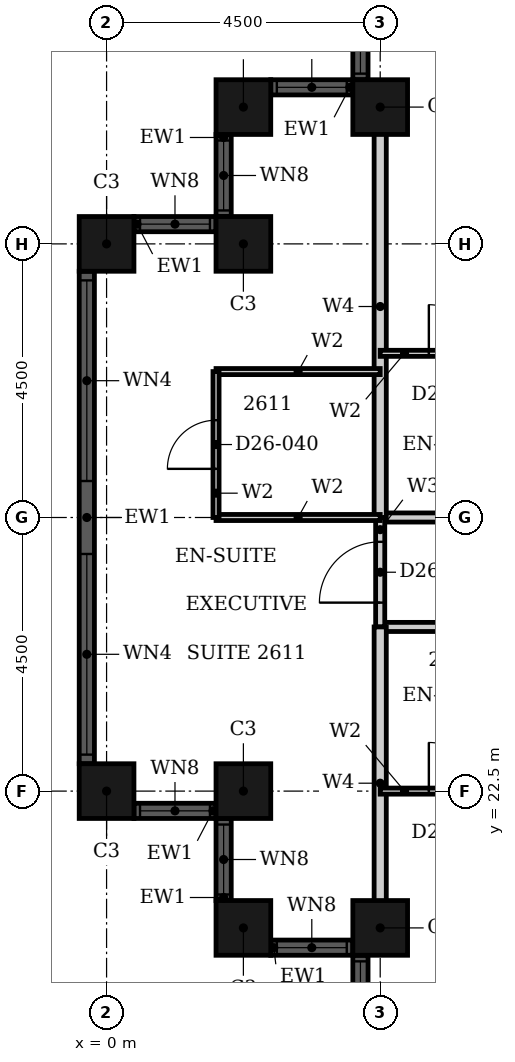
"""IFC4 building model, lengths in metres.
Left out: names, types, materials, properties, quantities, classifications, styles, units other than length and angle.
Written with IfcOpenShell. Run it as: python <this file> out.ifc"""

import sys

from ifc_helpers import new_model, si_unit, direction, frame, frame_2d, origin, origin_2d, place, context, subcontext, project, spatial, rectangle, hollow_rectangle, extrude, element, fill, save


model = new_model("IFC4")
c1 = context("Model", 3, precision=1e-05, world=origin(), true_north=direction((0.0, 1.0)))
c2 = subcontext(c1, "Body", "Model", "MODEL_VIEW")
j1 = project(units=[si_unit("LENGTHUNIT", "METRE"), si_unit("PLANEANGLEUNIT", "RADIAN")], contexts=[c1])
p1 = place(None, origin())
s1 = spatial("IfcSite", under=j1, at=p1, CompositionType="ELEMENT")
p2 = place(p1, origin())
s2 = spatial("IfcBuilding", under=s1, at=p2, CompositionType="ELEMENT")
p3 = place(p2, frame((0.0, 0.0, 108.0)))
s3 = spatial("IfcBuildingStorey", under=s2, at=p3, CompositionType="ELEMENT", Elevation=108.0)
for number, where, z_axis, x_axis in (
    (1, (4.5, 33.75, 0.0), (0.0, 0.0, 1.0), (1.0, 0.0, 0.0)),
    (2, (2.25, 33.75, 0.0), (0.0, 0.0, 1.0), (1.0, 0.0, 0.0)),
    (3, (2.25, 31.5, 0.0), (0.0, 0.0, 1.0), (1.0, 0.0, 0.0)),
    (4, (0.0, 31.5, 0.0), (0.0, 0.0, 1.0), (1.0, 0.0, 0.0)),
    (5, (0.0, 22.5, 0.0), (0.0, 0.0, 1.0), (1.0, 0.0, 0.0)),
    (6, (2.25, 22.5, 0.0), (0.0, 0.0, 1.0), (1.0, 0.0, 0.0)),
    (7, (2.25, 20.25, 0.0), (0.0, 0.0, 1.0), (1.0, 0.0, 0.0)),
    (8, (4.5, 20.25, 0.0), (0.0, 0.0, 1.0), (1.0, 0.0, 0.0)),
):
    element("IfcColumn", number, at=place(p3, frame(where, z_axis=z_axis, x_axis=x_axis)), inside=s3, PredefinedType="COLUMN", context=c2, shape_type="SweptSolid", body=[
        extrude(hollow_rectangle(XDim=0.9, YDim=0.9, WallThickness=0.028, at=origin_2d()), origin(), (0.0, 0.0, 1.0), 3.6),
    ])
p4 = place(p3, frame((4.175, 35.55, 0.0), z_axis=(0.0, 0.0, 1.0), x_axis=(0.0, -1.0, 0.0)))
e9 = element("IfcWall", 9, at=p4, inside=s3, PredefinedType="SOLIDWALL", context=c2, shape_type="SweptSolid", body=[
    extrude(rectangle(XDim=1.35, YDim=0.25, at=frame_2d((0.675, 0.0))), origin(), (0.0, 0.0, 1.0), 3.6),
])
p5 = place(p4, frame((0.1, 0.0, 0.9)))
e10 = element("IfcOpeningElement", 10, at=p5, cuts=e9, PredefinedType="OPENING", context=c2, shape_type="SweptSolid", body=[
    extrude(rectangle(XDim=1.15, YDim=2.08, at=frame_2d((0.575, 1.04))), frame((0.0, 0.135, 0.0), z_axis=(0.0, -1.0, 0.0), x_axis=(1.0, 0.0, 0.0)), (0.0, 0.0, 1.0), 0.27),
])
p6 = place(p3, frame((4.05, 34.075, 0.0), z_axis=(0.0, 0.0, 1.0), x_axis=(-1.0, 0.0, 0.0)))
e11 = element("IfcWall", 11, at=p6, inside=s3, PredefinedType="SOLIDWALL", context=c2, shape_type="SweptSolid", body=[
    extrude(rectangle(XDim=1.35, YDim=0.25, at=frame_2d((0.675, 0.0))), origin(), (0.0, 0.0, 1.0), 3.6),
])
p7 = place(p6, frame((0.1, 0.0, 0.9)))
e12 = element("IfcOpeningElement", 12, at=p7, cuts=e11, PredefinedType="OPENING", context=c2, shape_type="SweptSolid", body=[
    extrude(rectangle(XDim=1.15, YDim=2.08, at=frame_2d((0.575, 1.04))), frame((0.0, 0.135, 0.0), z_axis=(0.0, -1.0, 0.0), x_axis=(1.0, 0.0, 0.0)), (0.0, 0.0, 1.0), 0.27),
])
p8 = place(p3, frame((1.925, 33.3, 0.0), z_axis=(0.0, 0.0, 1.0), x_axis=(0.0, -1.0, 0.0)))
e13 = element("IfcWall", 13, at=p8, inside=s3, PredefinedType="SOLIDWALL", context=c2, shape_type="SweptSolid", body=[
    extrude(rectangle(XDim=1.35, YDim=0.25, at=frame_2d((0.675, 0.0))), origin(), (0.0, 0.0, 1.0), 3.6),
])
p9 = place(p8, frame((0.1, 0.0, 0.9)))
e14 = element("IfcOpeningElement", 14, at=p9, cuts=e13, PredefinedType="OPENING", context=c2, shape_type="SweptSolid", body=[
    extrude(rectangle(XDim=1.15, YDim=2.08, at=frame_2d((0.575, 1.04))), frame((0.0, 0.135, 0.0), z_axis=(0.0, -1.0, 0.0), x_axis=(1.0, 0.0, 0.0)), (0.0, 0.0, 1.0), 0.27),
])
p10 = place(p3, frame((1.8, 31.825, 0.0), z_axis=(0.0, 0.0, 1.0), x_axis=(-1.0, 0.0, 0.0)))
e15 = element("IfcWall", 15, at=p10, inside=s3, PredefinedType="SOLIDWALL", context=c2, shape_type="SweptSolid", body=[
    extrude(rectangle(XDim=1.35, YDim=0.25, at=frame_2d((0.675, 0.0))), origin(), (0.0, 0.0, 1.0), 3.6),
])
p11 = place(p10, frame((0.1, 0.0, 0.9)))
e16 = element("IfcOpeningElement", 16, at=p11, cuts=e15, PredefinedType="OPENING", context=c2, shape_type="SweptSolid", body=[
    extrude(rectangle(XDim=1.15, YDim=2.08, at=frame_2d((0.575, 1.04))), frame((0.0, 0.135, 0.0), z_axis=(0.0, -1.0, 0.0), x_axis=(1.0, 0.0, 0.0)), (0.0, 0.0, 1.0), 0.27),
])
p12 = place(p3, frame((-0.325, 31.05, 0.0), z_axis=(0.0, 0.0, 1.0), x_axis=(0.0, -1.0, 0.0)))
e17 = element("IfcWall", 17, at=p12, inside=s3, PredefinedType="SOLIDWALL", context=c2, shape_type="SweptSolid", body=[
    extrude(rectangle(XDim=8.1, YDim=0.25, at=frame_2d((4.05, 0.0))), origin(), (0.0, 0.0, 1.0), 3.6),
])
p13 = place(p12, frame((0.15, 0.0, 0.9)))
e18 = element("IfcOpeningElement", 18, at=p13, cuts=e17, PredefinedType="OPENING", context=c2, shape_type="SweptSolid", body=[
    extrude(rectangle(XDim=3.3, YDim=2.08, at=frame_2d((1.65, 1.04))), frame((0.0, 0.135, 0.0), z_axis=(0.0, -1.0, 0.0), x_axis=(1.0, 0.0, 0.0)), (0.0, 0.0, 1.0), 0.27),
])
p14 = place(p12, frame((4.65, 0.0, 0.9)))
e19 = element("IfcOpeningElement", 19, at=p14, cuts=e17, PredefinedType="OPENING", context=c2, shape_type="SweptSolid", body=[
    extrude(rectangle(XDim=3.3, YDim=2.08, at=frame_2d((1.65, 1.04))), frame((0.0, 0.135, 0.0), z_axis=(0.0, -1.0, 0.0), x_axis=(1.0, 0.0, 0.0)), (0.0, 0.0, 1.0), 0.27),
])
p15 = place(p3, frame((0.45, 22.175, 0.0), z_axis=(0.0, 0.0, 1.0), x_axis=(1.0, 0.0, 0.0)))
e20 = element("IfcWall", 20, at=p15, inside=s3, PredefinedType="SOLIDWALL", context=c2, shape_type="SweptSolid", body=[
    extrude(rectangle(XDim=1.35, YDim=0.25, at=frame_2d((0.675, 0.0))), origin(), (0.0, 0.0, 1.0), 3.6),
])
p16 = place(p15, frame((0.1, 0.0, 0.9)))
e21 = element("IfcOpeningElement", 21, at=p16, cuts=e20, PredefinedType="OPENING", context=c2, shape_type="SweptSolid", body=[
    extrude(rectangle(XDim=1.15, YDim=2.08, at=frame_2d((0.575, 1.04))), frame((0.0, 0.135, 0.0), z_axis=(0.0, -1.0, 0.0), x_axis=(1.0, 0.0, 0.0)), (0.0, 0.0, 1.0), 0.27),
])
p17 = place(p3, frame((1.925, 22.05, 0.0), z_axis=(0.0, 0.0, 1.0), x_axis=(0.0, -1.0, 0.0)))
e22 = element("IfcWall", 22, at=p17, inside=s3, PredefinedType="SOLIDWALL", context=c2, shape_type="SweptSolid", body=[
    extrude(rectangle(XDim=1.35, YDim=0.25, at=frame_2d((0.675, 0.0))), origin(), (0.0, 0.0, 1.0), 3.6),
])
p18 = place(p17, frame((0.1, 0.0, 0.9)))
e23 = element("IfcOpeningElement", 23, at=p18, cuts=e22, PredefinedType="OPENING", context=c2, shape_type="SweptSolid", body=[
    extrude(rectangle(XDim=1.15, YDim=2.08, at=frame_2d((0.575, 1.04))), frame((0.0, 0.135, 0.0), z_axis=(0.0, -1.0, 0.0), x_axis=(1.0, 0.0, 0.0)), (0.0, 0.0, 1.0), 0.27),
])
p19 = place(p3, frame((2.7, 19.925, 0.0), z_axis=(0.0, 0.0, 1.0), x_axis=(1.0, 0.0, 0.0)))
e24 = element("IfcWall", 24, at=p19, inside=s3, PredefinedType="SOLIDWALL", context=c2, shape_type="SweptSolid", body=[
    extrude(rectangle(XDim=1.35, YDim=0.25, at=frame_2d((0.675, 0.0))), origin(), (0.0, 0.0, 1.0), 3.6),
])
p20 = place(p19, frame((0.1, 0.0, 0.9)))
e25 = element("IfcOpeningElement", 25, at=p20, cuts=e24, PredefinedType="OPENING", context=c2, shape_type="SweptSolid", body=[
    extrude(rectangle(XDim=1.15, YDim=2.08, at=frame_2d((0.575, 1.04))), frame((0.0, 0.135, 0.0), z_axis=(0.0, -1.0, 0.0), x_axis=(1.0, 0.0, 0.0)), (0.0, 0.0, 1.0), 0.27),
])
p21 = place(p3, frame((4.175, 19.8, 0.0), z_axis=(0.0, 0.0, 1.0), x_axis=(0.0, -1.0, 0.0)))
e26 = element("IfcWall", 26, at=p21, inside=s3, PredefinedType="SOLIDWALL", context=c2, shape_type="SweptSolid", body=[
    extrude(rectangle(XDim=1.35, YDim=0.25, at=frame_2d((0.675, 0.0))), origin(), (0.0, 0.0, 1.0), 3.6),
])
p22 = place(p21, frame((0.1, 0.0, 0.9)))
e27 = element("IfcOpeningElement", 27, at=p22, cuts=e26, PredefinedType="OPENING", context=c2, shape_type="SweptSolid", body=[
    extrude(rectangle(XDim=1.15, YDim=2.08, at=frame_2d((0.575, 1.04))), frame((0.0, 0.135, 0.0), z_axis=(0.0, -1.0, 0.0), x_axis=(1.0, 0.0, 0.0)), (0.0, 0.0, 1.0), 0.27),
])
p23 = place(p3, frame((4.5, 25.2, 0.0), z_axis=(0.0, 0.0, 1.0), x_axis=(1.0, 0.0, 0.0)))
e28 = element("IfcWall", 28, at=p23, inside=s3, PredefinedType="PARTITIONING", context=c2, shape_type="SweptSolid", body=[
    extrude(rectangle(XDim=11.7, YDim=0.15, at=frame_2d((5.85, 0.0))), origin(), (0.0, 0.0, 1.0), 3.3),
])
p24 = place(p23, frame((7.45, 0.0, 0.0)))
e29 = element("IfcOpeningElement", 29, at=p24, cuts=e28, PredefinedType="OPENING", context=c2, shape_type="SweptSolid", body=[
    extrude(rectangle(XDim=1.0, YDim=2.1, at=frame_2d((0.5, 1.05))), frame((0.0, 0.085, 0.0), z_axis=(0.0, -1.0, 0.0), x_axis=(1.0, 0.0, 0.0)), (0.0, 0.0, 1.0), 0.17),
])
p25 = place(p23, frame((2.95, 0.0, 0.0)))
e30 = element("IfcOpeningElement", 30, at=p25, cuts=e28, PredefinedType="OPENING", context=c2, shape_type="SweptSolid", body=[
    extrude(rectangle(XDim=1.0, YDim=2.1, at=frame_2d((0.5, 1.05))), frame((0.0, 0.085, 0.0), z_axis=(0.0, -1.0, 0.0), x_axis=(1.0, 0.0, 0.0)), (0.0, 0.0, 1.0), 0.17),
])
p26 = place(p3, frame((4.5, 27.0, 0.0), z_axis=(0.0, 0.0, 1.0), x_axis=(1.0, 0.0, 0.0)))
e31 = element("IfcWall", 31, at=p26, inside=s3, PredefinedType="PARTITIONING", context=c2, shape_type="SweptSolid", body=[
    extrude(rectangle(XDim=11.7, YDim=0.15, at=frame_2d((5.85, 0.0))), origin(), (0.0, 0.0, 1.0), 2.58),
])
p27 = place(p26, frame((6.25, 0.0, 0.0)))
e32 = element("IfcOpeningElement", 32, at=p27, cuts=e31, PredefinedType="OPENING", context=c2, shape_type="SweptSolid", body=[
    extrude(rectangle(XDim=1.0, YDim=2.1, at=frame_2d((0.5, 1.05))), frame((0.0, 0.085, 0.0), z_axis=(0.0, -1.0, 0.0), x_axis=(1.0, 0.0, 0.0)), (0.0, 0.0, 1.0), 0.17),
])
p28 = place(p3, frame((4.5, 25.2, 0.0), z_axis=(0.0, 0.0, 1.0), x_axis=(0.0, 1.0, 0.0)))
e33 = element("IfcWall", 33, at=p28, inside=s3, PredefinedType="PARTITIONING", context=c2, shape_type="SweptSolid", body=[
    extrude(rectangle(XDim=1.8, YDim=0.15, at=frame_2d((0.9, 0.0))), origin(), (0.0, 0.0, 1.0), 3.3),
])
p29 = place(p28, frame((0.4, 0.0, 0.0)))
e34 = element("IfcOpeningElement", 34, at=p29, cuts=e33, PredefinedType="OPENING", context=c2, shape_type="SweptSolid", body=[
    extrude(rectangle(XDim=1.0, YDim=2.1, at=frame_2d((0.5, 1.05))), frame((0.0, 0.085, 0.0), z_axis=(0.0, -1.0, 0.0), x_axis=(1.0, 0.0, 0.0)), (0.0, 0.0, 1.0), 0.17),
])
p30 = place(p3, frame((4.5, 20.06, 0.0), z_axis=(0.0, 0.0, 1.0), x_axis=(0.0, 1.0, 0.0)))
e35 = element("IfcWall", 35, at=p30, inside=s3, PredefinedType="PARTITIONING", context=c2, shape_type="SweptSolid", body=[
    extrude(rectangle(XDim=5.14, YDim=0.2, at=frame_2d((2.57, 0.0))), origin(), (0.0, 0.0, 1.0), 3.3),
])
p31 = place(p3, frame((4.5, 27.0, 0.0), z_axis=(0.0, 0.0, 1.0), x_axis=(0.0, 1.0, 0.0)))
e36 = element("IfcWall", 36, at=p31, inside=s3, PredefinedType="PARTITIONING", context=c2, shape_type="SweptSolid", body=[
    extrude(rectangle(XDim=6.94, YDim=0.2, at=frame_2d((3.47, 0.0))), origin(), (0.0, 0.0, 1.0), 3.3),
])
p32 = place(p3, frame((4.5, 22.5, 0.0), z_axis=(0.0, 0.0, 1.0), x_axis=(1.0, 0.0, 0.0)))
e37 = element("IfcWall", 37, at=p32, inside=s3, PredefinedType="PARTITIONING", context=c2, shape_type="SweptSolid", body=[
    extrude(rectangle(XDim=2.4, YDim=0.1, at=frame_2d((1.2, 0.0))), origin(), (0.0, 0.0, 1.0), 2.58),
])
p33 = place(p32, frame((0.8, 0.0, 0.0)))
e38 = element("IfcOpeningElement", 38, at=p33, cuts=e37, PredefinedType="OPENING", context=c2, shape_type="SweptSolid", body=[
    extrude(rectangle(XDim=0.8, YDim=2.1, at=frame_2d((0.4, 1.05))), frame((0.0, 0.06, 0.0), z_axis=(0.0, -1.0, 0.0), x_axis=(1.0, 0.0, 0.0)), (0.0, 0.0, 1.0), 0.12),
])
p34 = place(p3, frame((1.8, 27.0, 0.0), z_axis=(0.0, 0.0, 1.0), x_axis=(1.0, 0.0, 0.0)))
e39 = element("IfcWall", 39, at=p34, inside=s3, PredefinedType="PARTITIONING", context=c2, shape_type="SweptSolid", body=[
    extrude(rectangle(XDim=2.7, YDim=0.1, at=frame_2d((1.35, 0.0))), origin(), (0.0, 0.0, 1.0), 2.58),
])
p35 = place(p3, frame((1.8, 29.4, 0.0), z_axis=(0.0, 0.0, 1.0), x_axis=(1.0, 0.0, 0.0)))
e40 = element("IfcWall", 40, at=p35, inside=s3, PredefinedType="PARTITIONING", context=c2, shape_type="SweptSolid", body=[
    extrude(rectangle(XDim=2.7, YDim=0.1, at=frame_2d((1.35, 0.0))), origin(), (0.0, 0.0, 1.0), 3.3),
])
p36 = place(p3, frame((4.5, 29.7, 0.0), z_axis=(0.0, 0.0, 1.0), x_axis=(1.0, 0.0, 0.0)))
e41 = element("IfcWall", 41, at=p36, inside=s3, PredefinedType="PARTITIONING", context=c2, shape_type="SweptSolid", body=[
    extrude(rectangle(XDim=2.4, YDim=0.1, at=frame_2d((1.2, 0.0))), origin(), (0.0, 0.0, 1.0), 3.3),
])
p37 = place(p36, frame((0.8, 0.0, 0.0)))
e42 = element("IfcOpeningElement", 42, at=p37, cuts=e41, PredefinedType="OPENING", context=c2, shape_type="SweptSolid", body=[
    extrude(rectangle(XDim=0.8, YDim=2.1, at=frame_2d((0.4, 1.05))), frame((0.0, 0.06, 0.0), z_axis=(0.0, -1.0, 0.0), x_axis=(1.0, 0.0, 0.0)), (0.0, 0.0, 1.0), 0.12),
])
p38 = place(p3, frame((1.8, 27.0, 0.0), z_axis=(0.0, 0.0, 1.0), x_axis=(0.0, 1.0, 0.0)))
e43 = element("IfcWall", 43, at=p38, inside=s3, PredefinedType="PARTITIONING", context=c2, shape_type="SweptSolid", body=[
    extrude(rectangle(XDim=2.4, YDim=0.1, at=frame_2d((1.2, 0.0))), origin(), (0.0, 0.0, 1.0), 3.3),
])
p39 = place(p38, frame((0.8, 0.0, 0.0)))
e44 = element("IfcOpeningElement", 44, at=p39, cuts=e43, PredefinedType="OPENING", context=c2, shape_type="SweptSolid", body=[
    extrude(rectangle(XDim=0.8, YDim=2.1, at=frame_2d((0.4, 1.05))), frame((0.0, 0.06, 0.0), z_axis=(0.0, -1.0, 0.0), x_axis=(1.0, 0.0, 0.0)), (0.0, 0.0, 1.0), 0.12),
])
p40 = place(p5, origin())
e45 = element("IfcWindow", 45, at=p40, inside=s3, PartitioningType="SINGLE_PANEL", PredefinedType="WINDOW", context=c2, shape_type="SweptSolid", body=[
    extrude(rectangle(XDim=1.15, YDim=2.08, at=frame_2d((0.575, 1.04))), frame((0.0, 0.03, 0.0), z_axis=(0.0, -1.0, 0.0), x_axis=(1.0, 0.0, 0.0)), (0.0, 0.0, 1.0), 0.06),
])
fill(e10, e45)
p41 = place(p7, origin())
e46 = element("IfcWindow", 46, at=p41, inside=s3, PartitioningType="SINGLE_PANEL", PredefinedType="WINDOW", context=c2, shape_type="SweptSolid", body=[
    extrude(rectangle(XDim=1.15, YDim=2.08, at=frame_2d((0.575, 1.04))), frame((0.0, 0.03, 0.0), z_axis=(0.0, -1.0, 0.0), x_axis=(1.0, 0.0, 0.0)), (0.0, 0.0, 1.0), 0.06),
])
fill(e12, e46)
p42 = place(p9, origin())
e47 = element("IfcWindow", 47, at=p42, inside=s3, PartitioningType="SINGLE_PANEL", PredefinedType="WINDOW", context=c2, shape_type="SweptSolid", body=[
    extrude(rectangle(XDim=1.15, YDim=2.08, at=frame_2d((0.575, 1.04))), frame((0.0, 0.03, 0.0), z_axis=(0.0, -1.0, 0.0), x_axis=(1.0, 0.0, 0.0)), (0.0, 0.0, 1.0), 0.06),
])
fill(e14, e47)
p43 = place(p11, origin())
e48 = element("IfcWindow", 48, at=p43, inside=s3, PartitioningType="SINGLE_PANEL", PredefinedType="WINDOW", context=c2, shape_type="SweptSolid", body=[
    extrude(rectangle(XDim=1.15, YDim=2.08, at=frame_2d((0.575, 1.04))), frame((0.0, 0.03, 0.0), z_axis=(0.0, -1.0, 0.0), x_axis=(1.0, 0.0, 0.0)), (0.0, 0.0, 1.0), 0.06),
])
fill(e16, e48)
p44 = place(p13, origin())
e49 = element("IfcWindow", 49, at=p44, inside=s3, PartitioningType="SINGLE_PANEL", PredefinedType="WINDOW", context=c2, shape_type="SweptSolid", body=[
    extrude(rectangle(XDim=3.3, YDim=2.08, at=frame_2d((1.65, 1.04))), frame((0.0, 0.03, 0.0), z_axis=(0.0, -1.0, 0.0), x_axis=(1.0, 0.0, 0.0)), (0.0, 0.0, 1.0), 0.06),
])
fill(e18, e49)
p45 = place(p14, origin())
e50 = element("IfcWindow", 50, at=p45, inside=s3, PartitioningType="SINGLE_PANEL", PredefinedType="WINDOW", context=c2, shape_type="SweptSolid", body=[
    extrude(rectangle(XDim=3.3, YDim=2.08, at=frame_2d((1.65, 1.04))), frame((0.0, 0.03, 0.0), z_axis=(0.0, -1.0, 0.0), x_axis=(1.0, 0.0, 0.0)), (0.0, 0.0, 1.0), 0.06),
])
fill(e19, e50)
p46 = place(p16, origin())
e51 = element("IfcWindow", 51, at=p46, inside=s3, PartitioningType="SINGLE_PANEL", PredefinedType="WINDOW", context=c2, shape_type="SweptSolid", body=[
    extrude(rectangle(XDim=1.15, YDim=2.08, at=frame_2d((0.575, 1.04))), frame((0.0, 0.03, 0.0), z_axis=(0.0, -1.0, 0.0), x_axis=(1.0, 0.0, 0.0)), (0.0, 0.0, 1.0), 0.06),
])
fill(e21, e51)
p47 = place(p18, origin())
e52 = element("IfcWindow", 52, at=p47, inside=s3, PartitioningType="SINGLE_PANEL", PredefinedType="WINDOW", context=c2, shape_type="SweptSolid", body=[
    extrude(rectangle(XDim=1.15, YDim=2.08, at=frame_2d((0.575, 1.04))), frame((0.0, 0.03, 0.0), z_axis=(0.0, -1.0, 0.0), x_axis=(1.0, 0.0, 0.0)), (0.0, 0.0, 1.0), 0.06),
])
fill(e23, e52)
p48 = place(p20, origin())
e53 = element("IfcWindow", 53, at=p48, inside=s3, PartitioningType="SINGLE_PANEL", PredefinedType="WINDOW", context=c2, shape_type="SweptSolid", body=[
    extrude(rectangle(XDim=1.15, YDim=2.08, at=frame_2d((0.575, 1.04))), frame((0.0, 0.03, 0.0), z_axis=(0.0, -1.0, 0.0), x_axis=(1.0, 0.0, 0.0)), (0.0, 0.0, 1.0), 0.06),
])
fill(e25, e53)
p49 = place(p22, origin())
e54 = element("IfcWindow", 54, at=p49, inside=s3, PartitioningType="SINGLE_PANEL", PredefinedType="WINDOW", context=c2, shape_type="SweptSolid", body=[
    extrude(rectangle(XDim=1.15, YDim=2.08, at=frame_2d((0.575, 1.04))), frame((0.0, 0.03, 0.0), z_axis=(0.0, -1.0, 0.0), x_axis=(1.0, 0.0, 0.0)), (0.0, 0.0, 1.0), 0.06),
])
fill(e27, e54)
p50 = place(p33, origin())
e55 = element("IfcDoor", 55, at=p50, inside=s3, OperationType="SINGLE_SWING_LEFT", PredefinedType="DOOR", context=c2, shape_type="SweptSolid", body=[
    extrude(rectangle(XDim=0.8, YDim=2.1, at=frame_2d((0.4, 1.05))), frame((0.0, 0.025, 0.0), z_axis=(0.0, -1.0, 0.0), x_axis=(1.0, 0.0, 0.0)), (0.0, 0.0, 1.0), 0.05),
])
fill(e38, e55)
p51 = place(p37, origin())
e56 = element("IfcDoor", 56, at=p51, inside=s3, OperationType="SINGLE_SWING_RIGHT", PredefinedType="DOOR", context=c2, shape_type="SweptSolid", body=[
    extrude(rectangle(XDim=0.8, YDim=2.1, at=frame_2d((0.4, 1.05))), frame((0.0, 0.025, 0.0), z_axis=(0.0, -1.0, 0.0), x_axis=(1.0, 0.0, 0.0)), (0.0, 0.0, 1.0), 0.05),
])
fill(e42, e56)
p52 = place(p29, origin())
e57 = element("IfcDoor", 57, at=p52, inside=s3, OperationType="SINGLE_SWING_LEFT", PredefinedType="DOOR", context=c2, shape_type="SweptSolid", body=[
    extrude(rectangle(XDim=1.0, YDim=2.1, at=frame_2d((0.5, 1.05))), frame((0.0, 0.025, 0.0), z_axis=(0.0, -1.0, 0.0), x_axis=(1.0, 0.0, 0.0)), (0.0, 0.0, 1.0), 0.05),
])
fill(e34, e57)
p53 = place(p39, origin())
e58 = element("IfcDoor", 58, at=p53, inside=s3, OperationType="SINGLE_SWING_RIGHT", PredefinedType="DOOR", context=c2, shape_type="SweptSolid", body=[
    extrude(rectangle(XDim=0.8, YDim=2.1, at=frame_2d((0.4, 1.05))), frame((0.0, 0.025, 0.0), z_axis=(0.0, -1.0, 0.0), x_axis=(1.0, 0.0, 0.0)), (0.0, 0.0, 1.0), 0.05),
])
fill(e44, e58)
save(model, sys.argv[1])
